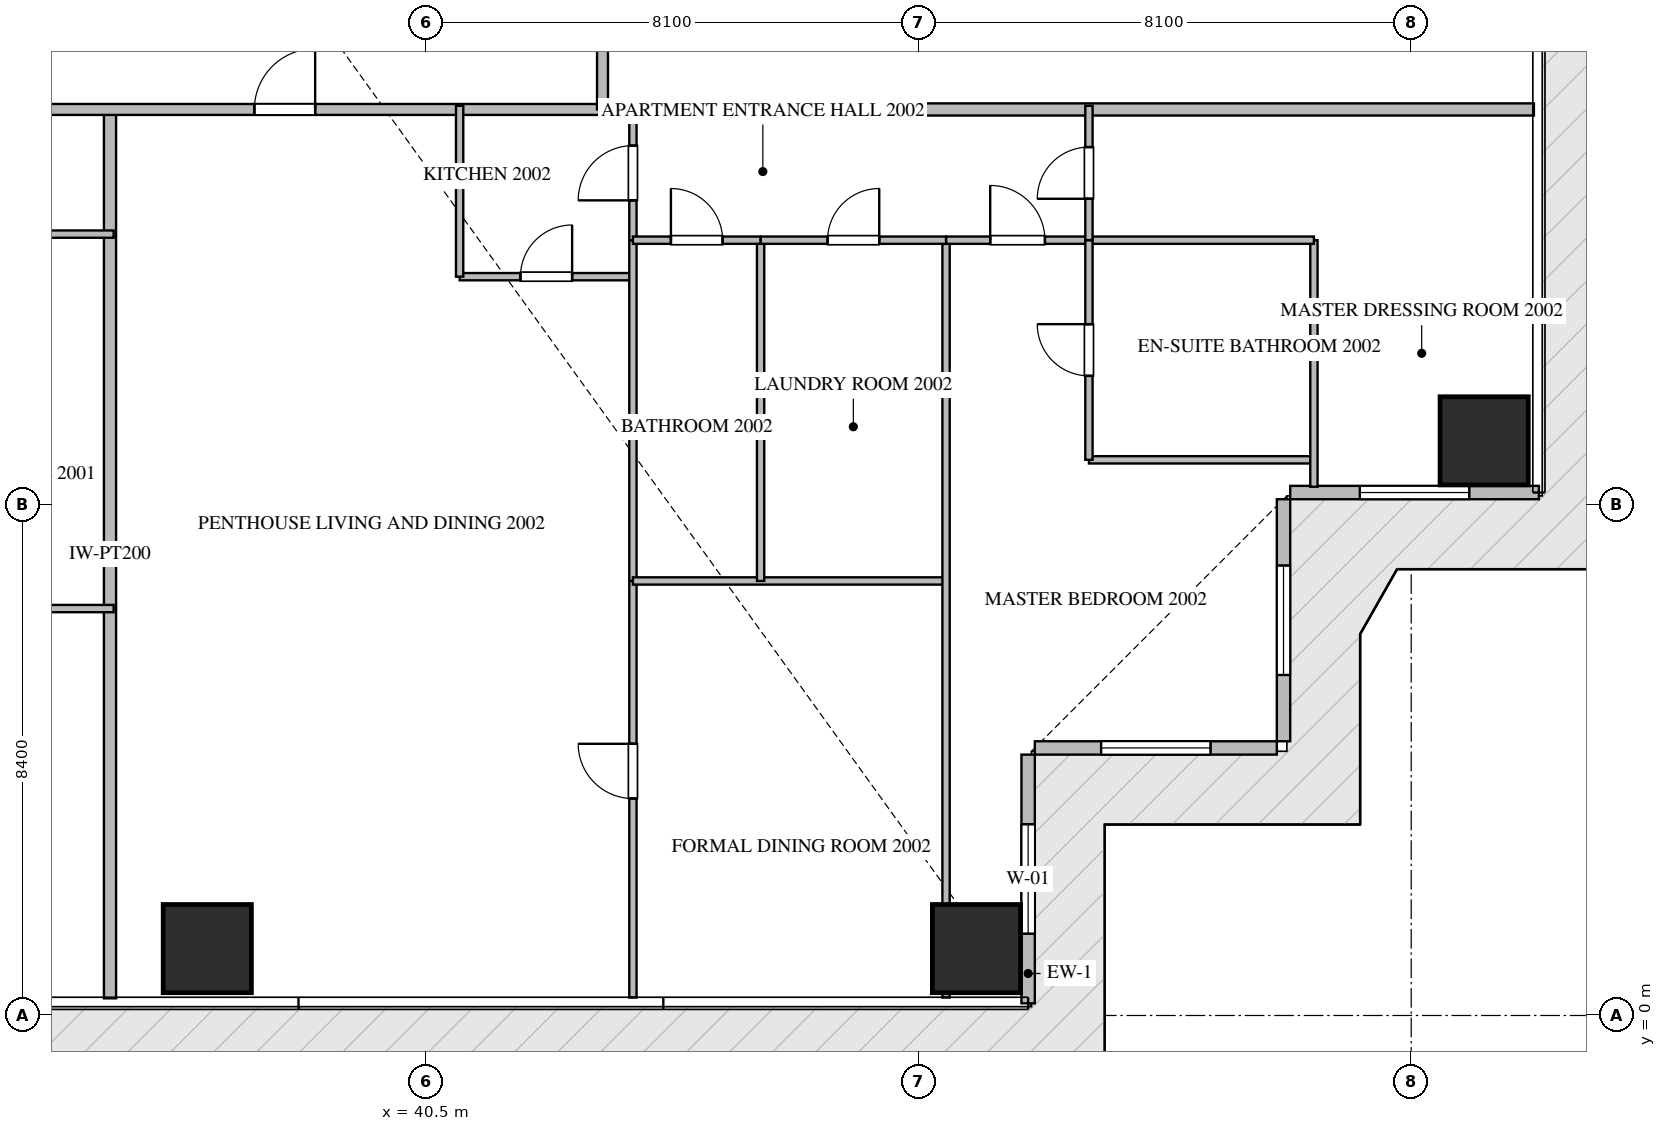
"""IFC4 building model, lengths in metres.
Left out: names, types, materials, properties, quantities, classifications, styles, units other than length and angle.
Written with IfcOpenShell. Run it as: python <this file> out.ifc"""

import sys

from ifc_helpers import new_model, si_unit, direction, frame, frame_2d, origin, origin_2d, place, context, subcontext, project, spatial, rectangle, extrude, source, transform, mapped, element, fill, save


model = new_model("IFC4")
c1 = context("Model", 3, precision=1e-05, world=origin(), true_north=direction((0.0, 1.0)))
c2 = subcontext(c1, "Body", "Model", "MODEL_VIEW")
j1 = project(units=[si_unit("LENGTHUNIT", "METRE"), si_unit("PLANEANGLEUNIT", "RADIAN")], contexts=[c1])
p1 = place(None, origin())
s1 = spatial("IfcSite", under=j1, at=p1, CompositionType="ELEMENT")
p2 = place(p1, origin())
s2 = spatial("IfcBuilding", under=s1, at=p2, CompositionType="ELEMENT")
p3 = place(p2, frame((0.0, 0.0, 82.95)))
s3 = spatial("IfcBuildingStorey", under=s2, at=p3, CompositionType="ELEMENT", Elevation=82.95)
m1 = source(origin(), c2, "Body", "SweptSolid", [
    extrude(rectangle(XDim=1.45, YDim=1.45, at=origin_2d()), origin(), (0.0, 0.0, 1.0), 3.75),
])
for number, where, z_axis, x_axis in (
    (1, (36.9, 1.1, -0.26), (0.0, 0.0, 1.0), (1.0, 0.0, 0.0)),
    (2, (49.55, 1.1, -0.26), (0.0, 0.0, 1.0), (1.0, 0.0, 0.0)),
    (3, (57.9, 9.45, -0.26), (0.0, 0.0, 1.0), (1.0, 0.0, 0.0)),
):
    element("IfcColumn", number, at=place(p3, frame(where, z_axis=z_axis, x_axis=x_axis)), inside=s3, PredefinedType="COLUMN", context=c2, shape_type="MappedRepresentation", body=[
        mapped(m1, transform((0.0, 0.0, 0.0), scale=1.0)),
    ])
p4 = place(p3, frame((50.4, 0.2, 0.0), z_axis=(0.0, 0.0, 1.0), x_axis=(0.0, 1.0, 0.0)))
e4 = element("IfcWall", 4, at=p4, inside=s3, PredefinedType="ELEMENTEDWALL", context=c2, shape_type="SweptSolid", body=[
    extrude(rectangle(XDim=4.09, YDim=0.22, at=frame_2d((2.045, 0.0))), origin(), (0.0, 0.0, 1.0), 3.475),
])
p5 = place(p4, frame((1.145, 0.0, 0.65)))
e5 = element("IfcOpeningElement", 5, at=p5, cuts=e4, PredefinedType="OPENING", context=c2, shape_type="SweptSolid", body=[
    extrude(rectangle(XDim=1.8, YDim=2.1, at=frame_2d((0.9, 1.05))), frame((0.0, 0.12, 0.0), z_axis=(0.0, -1.0, 0.0), x_axis=(1.0, 0.0, 0.0)), (0.0, 0.0, 1.0), 0.24),
])
p6 = place(p3, frame((50.51, 4.4, 0.0), z_axis=(0.0, 0.0, 1.0), x_axis=(1.0, 0.0, 0.0)))
e6 = element("IfcWall", 6, at=p6, inside=s3, PredefinedType="ELEMENTEDWALL", context=c2, shape_type="SweptSolid", body=[
    extrude(rectangle(XDim=3.98, YDim=0.22, at=frame_2d((1.99, 0.0))), origin(), (0.0, 0.0, 1.0), 3.475),
])
p7 = place(p6, frame((1.09, 0.0, 0.65)))
e7 = element("IfcOpeningElement", 7, at=p7, cuts=e6, PredefinedType="OPENING", context=c2, shape_type="SweptSolid", body=[
    extrude(rectangle(XDim=1.8, YDim=2.1, at=frame_2d((0.9, 1.05))), frame((0.0, 0.12, 0.0), z_axis=(0.0, -1.0, 0.0), x_axis=(1.0, 0.0, 0.0)), (0.0, 0.0, 1.0), 0.24),
])
p8 = place(p3, frame((54.6, 4.51, 0.0), z_axis=(0.0, 0.0, 1.0), x_axis=(0.0, 1.0, 0.0)))
e8 = element("IfcWall", 8, at=p8, inside=s3, PredefinedType="ELEMENTEDWALL", context=c2, shape_type="SweptSolid", body=[
    extrude(rectangle(XDim=3.98, YDim=0.22, at=frame_2d((1.99, 0.0))), origin(), (0.0, 0.0, 1.0), 3.475),
])
p9 = place(p8, frame((1.09, 0.0, 0.65)))
e9 = element("IfcOpeningElement", 9, at=p9, cuts=e8, PredefinedType="OPENING", context=c2, shape_type="SweptSolid", body=[
    extrude(rectangle(XDim=1.8, YDim=2.1, at=frame_2d((0.9, 1.05))), frame((0.0, 0.12, 0.0), z_axis=(0.0, -1.0, 0.0), x_axis=(1.0, 0.0, 0.0)), (0.0, 0.0, 1.0), 0.24),
])
p10 = place(p3, frame((54.71, 8.6, 0.0), z_axis=(0.0, 0.0, 1.0), x_axis=(1.0, 0.0, 0.0)))
e10 = element("IfcWall", 10, at=p10, inside=s3, PredefinedType="ELEMENTEDWALL", context=c2, shape_type="SweptSolid", body=[
    extrude(rectangle(XDim=4.09, YDim=0.22, at=frame_2d((2.045, 0.0))), origin(), (0.0, 0.0, 1.0), 3.475),
])
p11 = place(p10, frame((1.145, 0.0, 0.65)))
e11 = element("IfcOpeningElement", 11, at=p11, cuts=e10, PredefinedType="OPENING", context=c2, shape_type="SweptSolid", body=[
    extrude(rectangle(XDim=1.8, YDim=2.1, at=frame_2d((0.9, 1.05))), frame((0.0, 0.12, 0.0), z_axis=(0.0, -1.0, 0.0), x_axis=(1.0, 0.0, 0.0)), (0.0, 0.0, 1.0), 0.24),
])
p12 = place(p3, frame((35.3, 0.282, 0.0), z_axis=(0.0, 0.0, 1.0), x_axis=(0.0, 1.0, 0.0)))
e12 = element("IfcWall", 12, at=p12, inside=s3, PredefinedType="PARTITIONING", context=c2, shape_type="SweptSolid", body=[
    extrude(rectangle(XDim=14.618, YDim=0.2, at=frame_2d((7.309, 0.0))), origin(), (0.0, 0.0, 1.0), 3.49),
])
p13 = place(p3, frame((43.4, 14.9, 0.0), z_axis=(0.0, 0.0, 1.0), x_axis=(1.0, 0.0, 0.0)))
e13 = element("IfcWall", 13, at=p13, inside=s3, PredefinedType="PARTITIONING", context=c2, shape_type="SweptSolid", body=[
    extrude(rectangle(XDim=15.318, YDim=0.2, at=frame_2d((7.659, 0.0))), origin(), (0.0, 0.0, 1.0), 3.49),
])
p14 = place(p3, frame((21.402, 14.9, 0.0), z_axis=(0.0, 0.0, 1.0), x_axis=(1.0, 0.0, 0.0)))
e14 = element("IfcWall", 14, at=p14, inside=s3, PredefinedType="PARTITIONING", context=c2, shape_type="SweptSolid", body=[
    extrude(rectangle(XDim=21.996, YDim=0.18, at=frame_2d((10.998, 0.0))), origin(), (0.0, 0.0, 1.0), 3.49),
])
p15 = place(p14, frame((5.774, 0.0, 0.0)))
e15 = element("IfcOpeningElement", 15, at=p15, cuts=e14, PredefinedType="OPENING", context=c2, shape_type="SweptSolid", body=[
    extrude(rectangle(XDim=1.0, YDim=2.15, at=frame_2d((0.5, 1.075))), frame((0.0, 0.1, 0.0), z_axis=(0.0, -1.0, 0.0), x_axis=(1.0, 0.0, 0.0)), (0.0, 0.0, 1.0), 0.2),
])
p16 = place(p14, frame((16.272, 0.0, 0.0)))
e16 = element("IfcOpeningElement", 16, at=p16, cuts=e14, PredefinedType="OPENING", context=c2, shape_type="SweptSolid", body=[
    extrude(rectangle(XDim=1.0, YDim=2.15, at=frame_2d((0.5, 1.075))), frame((0.0, 0.1, 0.0), z_axis=(0.0, -1.0, 0.0), x_axis=(1.0, 0.0, 0.0)), (0.0, 0.0, 1.0), 0.2),
])
p17 = place(p3, frame((43.4, 14.9, 0.0), z_axis=(0.0, 0.0, 1.0), x_axis=(0.0, 1.0, 0.0)))
e17 = element("IfcWall", 17, at=p17, inside=s3, PredefinedType="PARTITIONING", context=c2, shape_type="SweptSolid", body=[
    extrude(rectangle(XDim=20.6, YDim=0.18, at=frame_2d((10.3, 0.0))), origin(), (0.0, 0.0, 1.0), 3.49),
])
p18 = place(p17, frame((1.82, 0.0, 0.0)))
e18 = element("IfcOpeningElement", 18, at=p18, cuts=e17, PredefinedType="OPENING", context=c2, shape_type="SweptSolid", body=[
    extrude(rectangle(XDim=1.0, YDim=2.15, at=frame_2d((0.5, 1.075))), frame((0.0, 0.1, 0.0), z_axis=(0.0, -1.0, 0.0), x_axis=(1.0, 0.0, 0.0)), (0.0, 0.0, 1.0), 0.2),
])
p19 = place(p17, frame((11.368, 0.0, 0.0)))
e19 = element("IfcOpeningElement", 19, at=p19, cuts=e17, PredefinedType="OPENING", context=c2, shape_type="SweptSolid", body=[
    extrude(rectangle(XDim=1.0, YDim=2.15, at=frame_2d((0.5, 1.075))), frame((0.0, 0.1, 0.0), z_axis=(0.0, -1.0, 0.0), x_axis=(1.0, 0.0, 0.0)), (0.0, 0.0, 1.0), 0.2),
])
p20 = place(p17, frame((18.06, 0.0, 0.0)))
e20 = element("IfcOpeningElement", 20, at=p20, cuts=e17, PredefinedType="OPENING", context=c2, shape_type="SweptSolid", body=[
    extrude(rectangle(XDim=1.0, YDim=2.15, at=frame_2d((0.5, 1.075))), frame((0.0, 0.1, 0.0), z_axis=(0.0, -1.0, 0.0), x_axis=(1.0, 0.0, 0.0)), (0.0, 0.0, 1.0), 0.2),
])
for number, where, z_axis, x_axis in (
    (21, (30.56, 6.692, 0.0), (0.0, 0.0, 1.0), (1.0, 0.0, 0.0)),
    (22, (30.56, 12.85, 0.0), (0.0, 0.0, 1.0), (1.0, 0.0, 0.0)),
):
    element("IfcWall", number, at=place(p3, frame(where, z_axis=z_axis, x_axis=x_axis)), inside=s3, PredefinedType="PARTITIONING", context=c2, shape_type="SweptSolid", body=[
        extrude(rectangle(XDim=4.8, YDim=0.12, at=frame_2d((2.4, 0.0))), origin(), (0.0, 0.0, 1.0), 3.49),
    ])
p21 = place(p3, frame((41.05, 12.15, 0.0), z_axis=(0.0, 0.0, 1.0), x_axis=(1.0, 0.0, 0.0)))
e23 = element("IfcWall", 23, at=p21, inside=s3, PredefinedType="PARTITIONING", context=c2, shape_type="SweptSolid", body=[
    extrude(rectangle(XDim=2.85, YDim=0.12, at=frame_2d((1.425, 0.0))), origin(), (0.0, 0.0, 1.0), 3.49),
])
p22 = place(p21, frame((1.0, 0.0, 0.0)))
e24 = element("IfcOpeningElement", 24, at=p22, cuts=e23, PredefinedType="OPENING", context=c2, shape_type="SweptSolid", body=[
    extrude(rectangle(XDim=0.85, YDim=2.1, at=frame_2d((0.425, 1.05))), frame((0.0, 0.07, 0.0), z_axis=(0.0, -1.0, 0.0), x_axis=(1.0, 0.0, 0.0)), (0.0, 0.0, 1.0), 0.14),
])
p23 = place(p3, frame((41.05, 12.15, 0.0), z_axis=(0.0, 0.0, 1.0), x_axis=(0.0, 1.0, 0.0)))
e25 = element("IfcWall", 25, at=p23, inside=s3, PredefinedType="PARTITIONING", context=c2, shape_type="SweptSolid", body=[
    extrude(rectangle(XDim=2.81, YDim=0.12, at=frame_2d((1.405, 0.0))), origin(), (0.0, 0.0, 1.0), 3.49),
])
p24 = place(p3, frame((43.9, 12.75, 0.0), z_axis=(0.0, 0.0, 1.0), x_axis=(0.0, 1.0, 0.0)))
e26 = element("IfcWall", 26, at=p24, inside=s3, PredefinedType="PARTITIONING", context=c2, shape_type="SweptSolid", body=[
    extrude(rectangle(XDim=2.21, YDim=0.12, at=frame_2d((1.105, 0.0))), origin(), (0.0, 0.0, 1.0), 3.49),
])
p25 = place(p24, frame((0.655, 0.0, 0.0)))
e27 = element("IfcOpeningElement", 27, at=p25, cuts=e26, PredefinedType="OPENING", context=c2, shape_type="SweptSolid", body=[
    extrude(rectangle(XDim=0.9, YDim=2.1, at=frame_2d((0.45, 1.05))), frame((0.0, 0.07, 0.0), z_axis=(0.0, -1.0, 0.0), x_axis=(1.0, 0.0, 0.0)), (0.0, 0.0, 1.0), 0.14),
])
p26 = place(p3, frame((43.9, 0.295, 0.0), z_axis=(0.0, 0.0, 1.0), x_axis=(0.0, 1.0, 0.0)))
e28 = element("IfcWall", 28, at=p26, inside=s3, PredefinedType="PARTITIONING", context=c2, shape_type="SweptSolid", body=[
    extrude(rectangle(XDim=6.851, YDim=0.12, at=frame_2d((3.426, 0.0))), origin(), (0.0, 0.0, 1.0), 3.49),
])
p27 = place(p26, frame((3.273, 0.0, 0.0)))
e29 = element("IfcOpeningElement", 29, at=p27, cuts=e28, PredefinedType="OPENING", context=c2, shape_type="SweptSolid", body=[
    extrude(rectangle(XDim=0.9, YDim=2.1, at=frame_2d((0.45, 1.05))), frame((0.0, 0.07, 0.0), z_axis=(0.0, -1.0, 0.0), x_axis=(1.0, 0.0, 0.0)), (0.0, 0.0, 1.0), 0.14),
])
p28 = place(p3, frame((43.9, 7.148, 0.0), z_axis=(0.0, 0.0, 1.0), x_axis=(0.0, 1.0, 0.0)))
e30 = element("IfcWall", 30, at=p28, inside=s3, PredefinedType="PARTITIONING", context=c2, shape_type="SweptSolid", body=[
    extrude(rectangle(XDim=5.6, YDim=0.12, at=frame_2d((2.8, 0.0))), origin(), (0.0, 0.0, 1.0), 3.49),
])
p29 = place(p3, frame((43.9, 7.146, 0.0), z_axis=(0.0, 0.0, 1.0), x_axis=(1.0, 0.0, 0.0)))
e31 = element("IfcWall", 31, at=p29, inside=s3, PredefinedType="PARTITIONING", context=c2, shape_type="SweptSolid", body=[
    extrude(rectangle(XDim=5.15, YDim=0.12, at=frame_2d((2.575, 0.0))), origin(), (0.0, 0.0, 1.0), 3.49),
])
p30 = place(p3, frame((49.05, 0.295, 0.0), z_axis=(0.0, 0.0, 1.0), x_axis=(0.0, 1.0, 0.0)))
e32 = element("IfcWall", 32, at=p30, inside=s3, PredefinedType="PARTITIONING", context=c2, shape_type="SweptSolid", body=[
    extrude(rectangle(XDim=12.455, YDim=0.12, at=frame_2d((6.228, 0.0))), origin(), (0.0, 0.0, 1.0), 3.49),
])
p31 = place(p3, frame((46.0, 7.146, 0.0), z_axis=(0.0, 0.0, 1.0), x_axis=(0.0, 1.0, 0.0)))
e33 = element("IfcWall", 33, at=p31, inside=s3, PredefinedType="PARTITIONING", context=c2, shape_type="SweptSolid", body=[
    extrude(rectangle(XDim=5.604, YDim=0.12, at=frame_2d((2.802, 0.0))), origin(), (0.0, 0.0, 1.0), 3.49),
])
p32 = place(p3, frame((43.9, 12.75, 0.0), z_axis=(0.0, 0.0, 1.0), x_axis=(1.0, 0.0, 0.0)))
e34 = element("IfcWall", 34, at=p32, inside=s3, PredefinedType="PARTITIONING", context=c2, shape_type="SweptSolid", body=[
    extrude(rectangle(XDim=2.1, YDim=0.12, at=frame_2d((1.05, 0.0))), origin(), (0.0, 0.0, 1.0), 3.49),
])
p33 = place(p32, frame((0.625, 0.0, 0.0)))
e35 = element("IfcOpeningElement", 35, at=p33, cuts=e34, PredefinedType="OPENING", context=c2, shape_type="SweptSolid", body=[
    extrude(rectangle(XDim=0.85, YDim=2.1, at=frame_2d((0.425, 1.05))), frame((0.0, 0.07, 0.0), z_axis=(0.0, -1.0, 0.0), x_axis=(1.0, 0.0, 0.0)), (0.0, 0.0, 1.0), 0.14),
])
p34 = place(p3, frame((46.002, 12.75, 0.0), z_axis=(0.0, 0.0, 1.0), x_axis=(1.0, 0.0, 0.0)))
e36 = element("IfcWall", 36, at=p34, inside=s3, PredefinedType="PARTITIONING", context=c2, shape_type="SweptSolid", body=[
    extrude(rectangle(XDim=3.048, YDim=0.12, at=frame_2d((1.524, 0.0))), origin(), (0.0, 0.0, 1.0), 3.49),
])
p35 = place(p34, frame((1.099, 0.0, 0.0)))
e37 = element("IfcOpeningElement", 37, at=p35, cuts=e36, PredefinedType="OPENING", context=c2, shape_type="SweptSolid", body=[
    extrude(rectangle(XDim=0.85, YDim=2.1, at=frame_2d((0.425, 1.05))), frame((0.0, 0.07, 0.0), z_axis=(0.0, -1.0, 0.0), x_axis=(1.0, 0.0, 0.0)), (0.0, 0.0, 1.0), 0.14),
])
p36 = place(p3, frame((49.052, 12.75, 0.0), z_axis=(0.0, 0.0, 1.0), x_axis=(1.0, 0.0, 0.0)))
e38 = element("IfcWall", 38, at=p36, inside=s3, PredefinedType="PARTITIONING", context=c2, shape_type="SweptSolid", body=[
    extrude(rectangle(XDim=2.348, YDim=0.12, at=frame_2d((1.174, 0.0))), origin(), (0.0, 0.0, 1.0), 3.49),
])
p37 = place(p36, frame((0.724, 0.0, 0.0)))
e39 = element("IfcOpeningElement", 39, at=p37, cuts=e38, PredefinedType="OPENING", context=c2, shape_type="SweptSolid", body=[
    extrude(rectangle(XDim=0.9, YDim=2.1, at=frame_2d((0.45, 1.05))), frame((0.0, 0.07, 0.0), z_axis=(0.0, -1.0, 0.0), x_axis=(1.0, 0.0, 0.0)), (0.0, 0.0, 1.0), 0.14),
])
p38 = place(p3, frame((51.4, 9.138, 0.0), z_axis=(0.0, 0.0, 1.0), x_axis=(1.0, 0.0, 0.0)))
e40 = element("IfcWall", 40, at=p38, inside=s3, PredefinedType="PARTITIONING", context=c2, shape_type="SweptSolid", body=[
    extrude(rectangle(XDim=3.7, YDim=0.12, at=frame_2d((1.85, 0.0))), origin(), (0.0, 0.0, 1.0), 3.49),
])
p39 = place(p3, frame((55.1, 8.695, 0.0), z_axis=(0.0, 0.0, 1.0), x_axis=(0.0, 1.0, 0.0)))
e41 = element("IfcWall", 41, at=p39, inside=s3, PredefinedType="PARTITIONING", context=c2, shape_type="SweptSolid", body=[
    extrude(rectangle(XDim=4.055, YDim=0.12, at=frame_2d((2.027, 0.0))), origin(), (0.0, 0.0, 1.0), 3.49),
])
p40 = place(p3, frame((51.402, 12.75, 0.0), z_axis=(0.0, 0.0, 1.0), x_axis=(1.0, 0.0, 0.0)))
e42 = element("IfcWall", 42, at=p40, inside=s3, PredefinedType="PARTITIONING", context=c2, shape_type="SweptSolid", body=[
    extrude(rectangle(XDim=3.698, YDim=0.12, at=frame_2d((1.849, 0.0))), origin(), (0.0, 0.0, 1.0), 3.49),
])
p41 = place(p3, frame((51.4, 9.138, 0.0), z_axis=(0.0, 0.0, 1.0), x_axis=(0.0, 1.0, 0.0)))
e43 = element("IfcWall", 43, at=p41, inside=s3, PredefinedType="PARTITIONING", context=c2, shape_type="SweptSolid", body=[
    extrude(rectangle(XDim=3.612, YDim=0.12, at=frame_2d((1.806, 0.0))), origin(), (0.0, 0.0, 1.0), 3.49),
])
p42 = place(p41, frame((1.381, 0.0, 0.0)))
e44 = element("IfcOpeningElement", 44, at=p42, cuts=e43, PredefinedType="OPENING", context=c2, shape_type="SweptSolid", body=[
    extrude(rectangle(XDim=0.85, YDim=2.1, at=frame_2d((0.425, 1.05))), frame((0.0, 0.07, 0.0), z_axis=(0.0, -1.0, 0.0), x_axis=(1.0, 0.0, 0.0)), (0.0, 0.0, 1.0), 0.14),
])
p43 = place(p3, frame((51.4, 12.752, 0.0), z_axis=(0.0, 0.0, 1.0), x_axis=(0.0, 1.0, 0.0)))
e45 = element("IfcWall", 45, at=p43, inside=s3, PredefinedType="PARTITIONING", context=c2, shape_type="SweptSolid", body=[
    extrude(rectangle(XDim=2.208, YDim=0.12, at=frame_2d((1.104, 0.0))), origin(), (0.0, 0.0, 1.0), 3.49),
])
p44 = place(p43, frame((0.679, 0.0, 0.0)))
e46 = element("IfcOpeningElement", 46, at=p44, cuts=e45, PredefinedType="OPENING", context=c2, shape_type="SweptSolid", body=[
    extrude(rectangle(XDim=0.85, YDim=2.1, at=frame_2d((0.425, 1.05))), frame((0.0, 0.07, 0.0), z_axis=(0.0, -1.0, 0.0), x_axis=(1.0, 0.0, 0.0)), (0.0, 0.0, 1.0), 0.14),
])
m2 = source(origin(), c2, "Body", "SweptSolid", [
    extrude(rectangle(XDim=1.8, YDim=2.1, at=frame_2d((0.9, 1.05))), frame((0.0, 0.03, 0.0), z_axis=(0.0, -1.0, 0.0), x_axis=(1.0, 0.0, 0.0)), (0.0, 0.0, 1.0), 0.06),
])
p45 = place(p5, origin())
e47 = element("IfcWindow", 47, at=p45, inside=s3, PartitioningType="SINGLE_PANEL", PredefinedType="WINDOW", context=c2, shape_type="MappedRepresentation", body=[
    mapped(m2, transform((0.0, 0.0, 0.0), scale=1.0)),
])
fill(e5, e47)
p46 = place(p7, origin())
e48 = element("IfcWindow", 48, at=p46, inside=s3, PartitioningType="SINGLE_PANEL", PredefinedType="WINDOW", context=c2, shape_type="MappedRepresentation", body=[
    mapped(m2, transform((0.0, 0.0, 0.0), scale=1.0)),
])
fill(e7, e48)
p47 = place(p9, origin())
e49 = element("IfcWindow", 49, at=p47, inside=s3, PartitioningType="SINGLE_PANEL", PredefinedType="WINDOW", context=c2, shape_type="MappedRepresentation", body=[
    mapped(m2, transform((0.0, 0.0, 0.0), scale=1.0)),
])
fill(e9, e49)
p48 = place(p11, origin())
e50 = element("IfcWindow", 50, at=p48, inside=s3, PartitioningType="SINGLE_PANEL", PredefinedType="WINDOW", context=c2, shape_type="MappedRepresentation", body=[
    mapped(m2, transform((0.0, 0.0, 0.0), scale=1.0)),
])
fill(e11, e50)
m3 = source(origin(), c2, "Body", "SweptSolid", [
    extrude(rectangle(XDim=1.0, YDim=2.15, at=frame_2d((0.5, 1.075))), frame((0.0, 0.025, 0.0), z_axis=(0.0, -1.0, 0.0), x_axis=(1.0, 0.0, 0.0)), (0.0, 0.0, 1.0), 0.05),
])
p49 = place(p16, origin())
e51 = element("IfcDoor", 51, at=p49, inside=s3, OperationType="SINGLE_SWING_RIGHT", PredefinedType="DOOR", context=c2, shape_type="MappedRepresentation", body=[
    mapped(m3, transform((0.0, 0.0, 0.0), scale=1.0)),
])
fill(e16, e51)
m4 = source(origin(), c2, "Body", "SweptSolid", [
    extrude(rectangle(XDim=0.85, YDim=2.1, at=frame_2d((0.425, 1.05))), frame((0.0, 0.025, 0.0), z_axis=(0.0, -1.0, 0.0), x_axis=(1.0, 0.0, 0.0)), (0.0, 0.0, 1.0), 0.05),
])
p50 = place(p22, origin())
e52 = element("IfcDoor", 52, at=p50, inside=s3, OperationType="SINGLE_SWING_RIGHT", PredefinedType="DOOR", context=c2, shape_type="MappedRepresentation", body=[
    mapped(m4, transform((0.0, 0.0, 0.0), scale=1.0)),
])
fill(e24, e52)
m5 = source(origin(), c2, "Body", "SweptSolid", [
    extrude(rectangle(XDim=0.9, YDim=2.1, at=frame_2d((0.45, 1.05))), frame((0.0, 0.025, 0.0), z_axis=(0.0, -1.0, 0.0), x_axis=(1.0, 0.0, 0.0)), (0.0, 0.0, 1.0), 0.05),
])
p51 = place(p25, origin())
e53 = element("IfcDoor", 53, at=p51, inside=s3, OperationType="SINGLE_SWING_LEFT", PredefinedType="DOOR", context=c2, shape_type="MappedRepresentation", body=[
    mapped(m5, transform((0.0, 0.0, 0.0), scale=1.0)),
])
fill(e27, e53)
p52 = place(p27, origin())
e54 = element("IfcDoor", 54, at=p52, inside=s3, OperationType="SINGLE_SWING_RIGHT", PredefinedType="DOOR", context=c2, shape_type="MappedRepresentation", body=[
    mapped(m5, transform((0.0, 0.0, 0.0), scale=1.0)),
])
fill(e29, e54)
p53 = place(p33, origin())
e55 = element("IfcDoor", 55, at=p53, inside=s3, OperationType="SINGLE_SWING_LEFT", PredefinedType="DOOR", context=c2, shape_type="MappedRepresentation", body=[
    mapped(m4, transform((0.0, 0.0, 0.0), scale=1.0)),
])
fill(e35, e55)
p54 = place(p35, origin())
e56 = element("IfcDoor", 56, at=p54, inside=s3, OperationType="SINGLE_SWING_RIGHT", PredefinedType="DOOR", context=c2, shape_type="MappedRepresentation", body=[
    mapped(m4, transform((0.0, 0.0, 0.0), scale=1.0)),
])
fill(e37, e56)
p55 = place(p37, origin())
e57 = element("IfcDoor", 57, at=p55, inside=s3, OperationType="SINGLE_SWING_LEFT", PredefinedType="DOOR", context=c2, shape_type="MappedRepresentation", body=[
    mapped(m5, transform((0.0, 0.0, 0.0), scale=1.0)),
])
fill(e39, e57)
p56 = place(p42, origin())
e58 = element("IfcDoor", 58, at=p56, inside=s3, OperationType="SINGLE_SWING_RIGHT", PredefinedType="DOOR", context=c2, shape_type="MappedRepresentation", body=[
    mapped(m4, transform((0.0, 0.0, 0.0), scale=1.0)),
])
fill(e44, e58)
p57 = place(p44, origin())
e59 = element("IfcDoor", 59, at=p57, inside=s3, OperationType="SINGLE_SWING_LEFT", PredefinedType="DOOR", context=c2, shape_type="MappedRepresentation", body=[
    mapped(m4, transform((0.0, 0.0, 0.0), scale=1.0)),
])
fill(e46, e59)
save(model, sys.argv[1])
